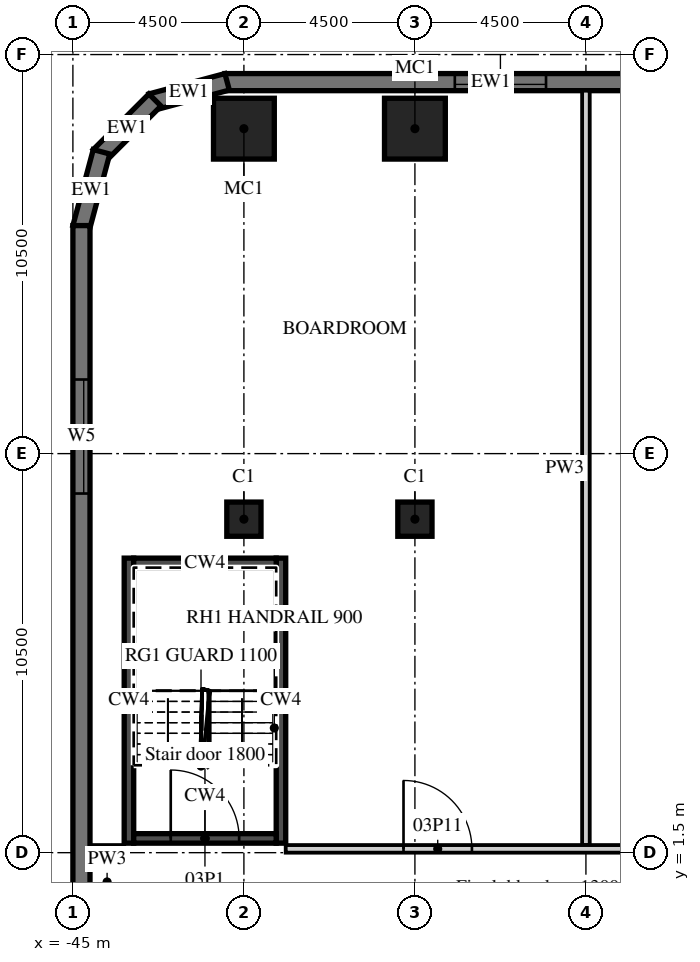
"""IFC4 building model, lengths in metres.
Left out: names, types, materials, properties, quantities, classifications, styles, units other than length and angle.
Written with IfcOpenShell. Run it as: python <this file> out.ifc"""

import sys

from ifc_helpers import new_model, si_unit, direction, frame, frame_2d, origin, origin_2d, place, context, subcontext, project, spatial, polyline, rectangle, outline, extrude, element, fill, save


model = new_model("IFC4")
c1 = context("Model", 3, precision=1e-05, world=origin(), true_north=direction((0.0, 1.0)))
c2 = subcontext(c1, "Body", "Model", "MODEL_VIEW")
j1 = project(units=[si_unit("LENGTHUNIT", "METRE"), si_unit("PLANEANGLEUNIT", "RADIAN")], contexts=[c1])
p1 = place(None, origin())
s1 = spatial("IfcSite", under=j1, at=p1, CompositionType="ELEMENT")
p2 = place(p1, origin())
s2 = spatial("IfcBuilding", under=s1, at=p2, CompositionType="ELEMENT")
p3 = place(p2, frame((0.0, 0.0, 23.5)))
s3 = spatial("IfcBuildingStorey", under=s2, at=p3, CompositionType="ELEMENT", Elevation=23.5)
for number, where, z_axis, x_axis in (
    (1, (-40.5, 20.55, 0.0), (0.0, 0.0, 1.0), (1.0, 0.0, 0.0)),
    (2, (-36.0, 20.55, 0.0), (0.0, 0.0, 1.0), (1.0, 0.0, 0.0)),
):
    element("IfcColumn", number, at=place(p3, frame(where, z_axis=z_axis, x_axis=x_axis)), inside=s3, PredefinedType="COLUMN", context=c2, shape_type="SweptSolid", body=[
        extrude(rectangle(XDim=1.6, YDim=1.6, at=origin_2d()), origin(), (0.0, 0.0, 1.0), 5.5),
    ])
for number, where, z_axis, x_axis in (
    (3, (-40.5, 10.275, 0.0), (0.0, 0.0, 1.0), (1.0, 0.0, 0.0)),
    (4, (-36.0, 10.275, 0.0), (0.0, 0.0, 1.0), (1.0, 0.0, 0.0)),
):
    element("IfcColumn", number, at=place(p3, frame(where, z_axis=z_axis, x_axis=x_axis)), inside=s3, PredefinedType="COLUMN", context=c2, shape_type="SweptSolid", body=[
        extrude(rectangle(XDim=0.9, YDim=0.9, at=origin_2d()), origin(), (0.0, 0.0, 1.0), 5.5),
    ])
p4 = place(p3, frame((-27.0, 21.775, 0.0), z_axis=(0.0, 0.0, 1.0), x_axis=(-1.0, 0.0, 0.0)))
e5 = element("IfcWall", 5, at=p4, inside=s3, PredefinedType="SOLIDWALL", context=c2, shape_type="SweptSolid", body=[
    extrude(rectangle(XDim=14.0, YDim=0.45, at=frame_2d((7.0, 0.0))), origin(), (0.0, 0.0, 1.0), 5.05),
])
p5 = place(p4, frame((1.05, 0.0, 0.9)))
e6 = element("IfcOpeningElement", 6, at=p5, cuts=e5, PredefinedType="OPENING", context=c2, shape_type="SweptSolid", body=[
    extrude(rectangle(XDim=2.4, YDim=1.8, at=frame_2d((1.2, 0.9))), frame((0.0, 0.235, 0.0), z_axis=(0.0, -1.0, 0.0), x_axis=(1.0, 0.0, 0.0)), (0.0, 0.0, 1.0), 0.47),
])
p6 = place(p4, frame((5.55, 0.0, 0.9)))
e7 = element("IfcOpeningElement", 7, at=p6, cuts=e5, PredefinedType="OPENING", context=c2, shape_type="SweptSolid", body=[
    extrude(rectangle(XDim=2.4, YDim=1.8, at=frame_2d((1.2, 0.9))), frame((0.0, 0.235, 0.0), z_axis=(0.0, -1.0, 0.0), x_axis=(1.0, 0.0, 0.0)), (0.0, 0.0, 1.0), 0.47),
])
p7 = place(p3, frame((-40.942, 21.783, 0.0), z_axis=(0.0, 0.0, 1.0), x_axis=(-0.965926999034, -0.25881466832, 0.0)))
e8 = element("IfcWall", 8, at=p7, inside=s3, PredefinedType="SOLIDWALL", context=c2, shape_type="SweptSolid", body=[
    extrude(outline(polyline([(0.0, -0.225), (2.071, -0.225), (1.95, 0.225), (0.121, 0.225), (0.0, -0.225)])), origin(), (0.0, 0.0, 1.0), 5.05),
])
p8 = place(p3, frame((-42.841, 21.305, 0.0), z_axis=(0.0, 0.0, 1.0), x_axis=(-0.707106781187, -0.707106781187, 0.0)))
e9 = element("IfcWall", 9, at=p8, inside=s3, PredefinedType="SOLIDWALL", context=c2, shape_type="SweptSolid", body=[
    extrude(outline(polyline([(0.0, -0.225), (2.071, -0.225), (1.95, 0.225), (0.121, 0.225), (0.0, -0.225)])), origin(), (0.0, 0.0, 1.0), 5.05),
])
p9 = place(p3, frame((-44.247, 19.942, 0.0), z_axis=(0.0, 0.0, 1.0), x_axis=(-0.25881466832, -0.965926999034, 0.0)))
e10 = element("IfcWall", 10, at=p9, inside=s3, PredefinedType="SOLIDWALL", context=c2, shape_type="SweptSolid", body=[
    extrude(outline(polyline([(-0.0, -0.225), (2.07, -0.225), (1.95, 0.225), (0.12, 0.225), (-0.0, -0.225)])), origin(), (0.0, 0.0, 1.0), 5.05),
])
p10 = place(p3, frame((-44.775, 18.0, 0.0), z_axis=(0.0, 0.0, 1.0), x_axis=(0.0, -1.0, 0.0)))
e11 = element("IfcWall", 11, at=p10, inside=s3, PredefinedType="SOLIDWALL", context=c2, shape_type="SweptSolid", body=[
    extrude(rectangle(XDim=36.0, YDim=0.45, at=frame_2d((18.0, 0.0))), origin(), (0.0, 0.0, 1.0), 5.05),
])
p11 = place(p10, frame((4.05, 0.0, 0.9)))
e12 = element("IfcOpeningElement", 12, at=p11, cuts=e11, PredefinedType="OPENING", context=c2, shape_type="SweptSolid", body=[
    extrude(rectangle(XDim=3.0, YDim=1.8, at=frame_2d((1.5, 0.9))), frame((0.0, 0.235, 0.0), z_axis=(0.0, -1.0, 0.0), x_axis=(1.0, 0.0, 0.0)), (0.0, 0.0, 1.0), 0.47),
])
for number, where, z_axis, x_axis in (
    (13, (-43.525, 1.75, 0.0), (0.0, 0.0, 1.0), (0.0, 1.0, 0.0)),
    (14, (-39.525, 1.75, 0.0), (0.0, 0.0, 1.0), (0.0, 1.0, 0.0)),
):
    element("IfcWall", number, at=place(p3, frame(where, z_axis=z_axis, x_axis=x_axis)), inside=s3, PredefinedType="SHEAR", context=c2, shape_type="SweptSolid", body=[
        extrude(rectangle(XDim=7.5, YDim=0.25, at=frame_2d((3.75, 0.0))), origin(), (0.0, 0.0, 1.0), 5.05),
    ])
p12 = place(p3, frame((-43.4, 9.125, 0.0), z_axis=(0.0, 0.0, 1.0), x_axis=(1.0, 0.0, 0.0)))
e15 = element("IfcWall", 15, at=p12, inside=s3, PredefinedType="SHEAR", context=c2, shape_type="SweptSolid", body=[
    extrude(rectangle(XDim=3.75, YDim=0.25, at=frame_2d((1.875, 0.0))), origin(), (0.0, 0.0, 1.0), 5.05),
])
p13 = place(p3, frame((-43.4, 1.875, 0.0), z_axis=(0.0, 0.0, 1.0), x_axis=(1.0, 0.0, 0.0)))
e16 = element("IfcWall", 16, at=p13, inside=s3, PredefinedType="SHEAR", context=c2, shape_type="SweptSolid", body=[
    extrude(rectangle(XDim=3.75, YDim=0.25, at=frame_2d((1.875, 0.0))), origin(), (0.0, 0.0, 1.0), 5.05),
])
p14 = place(p13, frame((0.975, 0.0, 0.0)))
e17 = element("IfcOpeningElement", 17, at=p14, cuts=e16, PredefinedType="OPENING", context=c2, shape_type="SweptSolid", body=[
    extrude(rectangle(XDim=1.8, YDim=2.1, at=frame_2d((0.9, 1.05))), frame((0.0, 0.135, 0.0), z_axis=(0.0, -1.0, 0.0), x_axis=(1.0, 0.0, 0.0)), (0.0, 0.0, 1.0), 0.27),
])
p15 = place(p3, frame((-31.5, 1.7, 0.0), z_axis=(0.0, 0.0, 1.0), x_axis=(0.0, 1.0, 0.0)))
e18 = element("IfcWall", 18, at=p15, inside=s3, PredefinedType="PARTITIONING", context=c2, shape_type="SweptSolid", body=[
    extrude(rectangle(XDim=19.85, YDim=0.2, at=frame_2d((9.925, 0.0))), origin(), (0.0, 0.0, 1.0), 5.05),
])
p16 = place(p3, frame((-39.4, 1.6, 0.0), z_axis=(0.0, 0.0, 1.0), x_axis=(1.0, 0.0, 0.0)))
e19 = element("IfcWall", 19, at=p16, inside=s3, PredefinedType="PARTITIONING", context=c2, shape_type="SweptSolid", body=[
    extrude(rectangle(XDim=52.7, YDim=0.2, at=frame_2d((26.35, 0.0))), origin(), (0.0, 0.0, 1.0), 5.05),
])
p17 = place(p16, frame((50.3, 0.0, 0.0)))
e20 = element("IfcOpeningElement", 20, at=p17, cuts=e19, PredefinedType="OPENING", context=c2, shape_type="SweptSolid", body=[
    extrude(rectangle(XDim=1.2, YDim=2.1, at=frame_2d((0.6, 1.05))), frame((0.0, 0.11, 0.0), z_axis=(0.0, -1.0, 0.0), x_axis=(1.0, 0.0, 0.0)), (0.0, 0.0, 1.0), 0.22),
])
p18 = place(p16, frame((37.56, 0.0, 0.0)))
e21 = element("IfcOpeningElement", 21, at=p18, cuts=e19, PredefinedType="OPENING", context=c2, shape_type="SweptSolid", body=[
    extrude(rectangle(XDim=1.8, YDim=2.1, at=frame_2d((0.9, 1.05))), frame((0.0, 0.11, 0.0), z_axis=(0.0, -1.0, 0.0), x_axis=(1.0, 0.0, 0.0)), (0.0, 0.0, 1.0), 0.22),
])
p19 = place(p16, frame((30.44, 0.0, 0.0)))
e22 = element("IfcOpeningElement", 22, at=p19, cuts=e19, PredefinedType="OPENING", context=c2, shape_type="SweptSolid", body=[
    extrude(rectangle(XDim=1.8, YDim=2.1, at=frame_2d((0.9, 1.05))), frame((0.0, 0.11, 0.0), z_axis=(0.0, -1.0, 0.0), x_axis=(1.0, 0.0, 0.0)), (0.0, 0.0, 1.0), 0.22),
])
p20 = place(p16, frame((19.56, 0.0, 0.0)))
e23 = element("IfcOpeningElement", 23, at=p20, cuts=e19, PredefinedType="OPENING", context=c2, shape_type="SweptSolid", body=[
    extrude(rectangle(XDim=1.8, YDim=2.1, at=frame_2d((0.9, 1.05))), frame((0.0, 0.11, 0.0), z_axis=(0.0, -1.0, 0.0), x_axis=(1.0, 0.0, 0.0)), (0.0, 0.0, 1.0), 0.22),
])
p21 = place(p16, frame((12.44, 0.0, 0.0)))
e24 = element("IfcOpeningElement", 24, at=p21, cuts=e19, PredefinedType="OPENING", context=c2, shape_type="SweptSolid", body=[
    extrude(rectangle(XDim=1.8, YDim=2.1, at=frame_2d((0.9, 1.05))), frame((0.0, 0.11, 0.0), z_axis=(0.0, -1.0, 0.0), x_axis=(1.0, 0.0, 0.0)), (0.0, 0.0, 1.0), 0.22),
])
p22 = place(p16, frame((3.1, 0.0, 0.0)))
e25 = element("IfcOpeningElement", 25, at=p22, cuts=e19, PredefinedType="OPENING", context=c2, shape_type="SweptSolid", body=[
    extrude(rectangle(XDim=1.8, YDim=2.1, at=frame_2d((0.9, 1.05))), frame((0.0, 0.11, 0.0), z_axis=(0.0, -1.0, 0.0), x_axis=(1.0, 0.0, 0.0)), (0.0, 0.0, 1.0), 0.22),
])
p23 = place(p3, frame((-44.55, 1.6, 0.0), z_axis=(0.0, 0.0, 1.0), x_axis=(1.0, 0.0, 0.0)))
e26 = element("IfcWall", 26, at=p23, inside=s3, PredefinedType="PARTITIONING", context=c2, shape_type="SweptSolid", body=[
    extrude(rectangle(XDim=0.9, YDim=0.2, at=frame_2d((0.45, 0.0))), origin(), (0.0, 0.0, 1.0), 5.05),
])
p24 = place(p6, origin())
e27 = element("IfcWindow", 27, at=p24, inside=s3, PartitioningType="SINGLE_PANEL", PredefinedType="WINDOW", context=c2, shape_type="SweptSolid", body=[
    extrude(rectangle(XDim=2.4, YDim=1.8, at=frame_2d((1.2, 0.9))), frame((0.0, 0.09, 0.0), z_axis=(0.0, -1.0, 0.0), x_axis=(1.0, 0.0, 0.0)), (0.0, 0.0, 1.0), 0.06),
])
fill(e7, e27)
p25 = place(p11, origin())
e28 = element("IfcWindow", 28, at=p25, inside=s3, PartitioningType="SINGLE_PANEL", PredefinedType="WINDOW", context=c2, shape_type="SweptSolid", body=[
    extrude(rectangle(XDim=3.0, YDim=1.8, at=frame_2d((1.5, 0.9))), frame((0.0, 0.09, 0.0), z_axis=(0.0, -1.0, 0.0), x_axis=(1.0, 0.0, 0.0)), (0.0, 0.0, 1.0), 0.06),
])
fill(e12, e28)
p26 = place(p14, origin())
e29 = element("IfcDoor", 29, at=p26, inside=s3, OperationType="DOUBLE_DOOR_DOUBLE_SWING", PredefinedType="DOOR", context=c2, shape_type="SweptSolid", body=[
    extrude(rectangle(XDim=1.8, YDim=2.1, at=frame_2d((0.9, 1.05))), frame((0.0, 0.025, 0.0), z_axis=(0.0, -1.0, 0.0), x_axis=(1.0, 0.0, 0.0)), (0.0, 0.0, 1.0), 0.05),
])
fill(e17, e29)
p27 = place(p22, origin())
e30 = element("IfcDoor", 30, at=p27, inside=s3, OperationType="DOUBLE_DOOR_DOUBLE_SWING", PredefinedType="DOOR", context=c2, shape_type="SweptSolid", body=[
    extrude(rectangle(XDim=1.8, YDim=2.1, at=frame_2d((0.9, 1.05))), frame((0.0, 0.025, 0.0), z_axis=(0.0, -1.0, 0.0), x_axis=(1.0, 0.0, 0.0)), (0.0, 0.0, 1.0), 0.05),
])
fill(e25, e30)
save(model, sys.argv[1])
